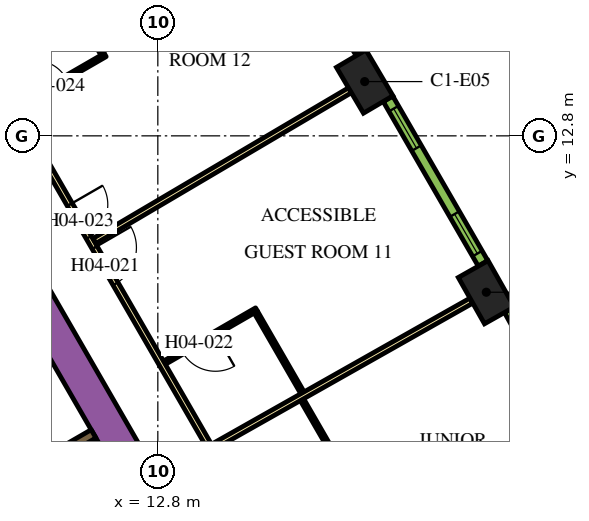
"""IFC4 building model, lengths in metres.
Left out: names, types, materials, properties, quantities, classifications, styles, units other than length and angle.
Written with IfcOpenShell. Run it as: python <this file> out.ifc"""

import sys

from ifc_helpers import new_model, si_unit, direction, frame, frame_2d, origin, origin_2d, place, context, subcontext, project, spatial, rectangle, extrude, element, fill, save


model = new_model("IFC4")
c1 = context("Model", 3, precision=1e-05, world=origin(), true_north=direction((0.0, 1.0)))
c2 = subcontext(c1, "Body", "Model", "MODEL_VIEW")
j1 = project(units=[si_unit("LENGTHUNIT", "METRE"), si_unit("PLANEANGLEUNIT", "RADIAN")], contexts=[c1])
p1 = place(None, origin())
s1 = spatial("IfcSite", under=j1, at=p1, CompositionType="ELEMENT")
p2 = place(p1, origin())
s2 = spatial("IfcBuilding", under=s1, at=p2, CompositionType="ELEMENT")
p3 = place(p2, frame((0.0, 0.0, 70.5)))
s3 = spatial("IfcBuildingStorey", under=s2, at=p3, CompositionType="ELEMENT", Elevation=70.5)
for number, where, z_axis, x_axis in (
    (1, (21.443, 8.685, 0.0), (0.0, 0.0, 1.0), (-0.492, 0.871, 0.0)),
    (2, (18.243, 14.228, 0.0), (0.0, 0.0, 1.0), (-0.508, 0.861, 0.0)),
):
    element("IfcColumn", number, at=place(p3, frame(where, z_axis=z_axis, x_axis=x_axis)), inside=s3, PredefinedType="COLUMN", context=c2, shape_type="SweptSolid", body=[
        extrude(rectangle(XDim=1.4, YDim=0.9, at=origin_2d()), origin(), (0.0, 0.0, 1.0), 3.9),
    ])
p4 = place(p3, frame((6.461, 13.909, 0.0), z_axis=(0.0, 0.0, 1.0), x_axis=(0.500005804227, -0.866022052686, 0.0)))
e3 = element("IfcWall", 3, at=p4, inside=s3, PredefinedType="SOLIDWALL", context=c2, shape_type="SweptSolid", body=[
    extrude(rectangle(XDim=20.834, YDim=0.9, at=frame_2d((10.417, 0.0))), origin(), (0.0, 0.0, 1.0), 3.9),
])
p5 = place(p3, frame((9.204, 3.859, 0.0), z_axis=(0.0, 0.0, 1.0), x_axis=(0.86605622881, 0.499946605688, 0.0)))
e4 = element("IfcWall", 4, at=p5, inside=s3, PredefinedType="SOLIDWALL", context=c2, shape_type="SweptSolid", body=[
    extrude(rectangle(XDim=2.2, YDim=0.25, at=frame_2d((1.1, 0.0))), origin(), (0.0, 0.0, 1.0), 3.9),
])
p6 = place(p3, frame((11.553, -0.46, 0.0), z_axis=(0.0, 0.0, 1.0), x_axis=(-0.500006514828, 0.866021642414, 0.0)))
e5 = element("IfcWall", 5, at=p6, inside=s3, PredefinedType="SOLIDWALL", context=c2, shape_type="SweptSolid", body=[
    extrude(rectangle(XDim=12.35, YDim=0.25, at=frame_2d((6.175, 0.0))), origin(), (0.0, 0.0, 1.0), 3.9),
])
p7 = place(p6, frame((0.585, 0.0, 0.0)))
e6 = element("IfcOpeningElement", 6, at=p7, cuts=e5, PredefinedType="OPENING", context=c2, shape_type="SweptSolid", body=[
    extrude(rectangle(XDim=1.1, YDim=2.1, at=frame_2d((0.55, 1.05))), frame((0.0, 0.135, 0.0), z_axis=(0.0, -1.0, 0.0), x_axis=(1.0, 0.0, 0.0)), (0.0, 0.0, 1.0), 0.27),
])
p8 = place(p6, frame((3.105, 0.0, 0.0)))
e7 = element("IfcOpeningElement", 7, at=p8, cuts=e5, PredefinedType="OPENING", context=c2, shape_type="SweptSolid", body=[
    extrude(rectangle(XDim=1.1, YDim=2.1, at=frame_2d((0.55, 1.05))), frame((0.0, 0.135, 0.0), z_axis=(0.0, -1.0, 0.0), x_axis=(1.0, 0.0, 0.0)), (0.0, 0.0, 1.0), 0.27),
])
p9 = place(p6, frame((5.625, 0.0, 0.0)))
e8 = element("IfcOpeningElement", 8, at=p9, cuts=e5, PredefinedType="OPENING", context=c2, shape_type="SweptSolid", body=[
    extrude(rectangle(XDim=1.1, YDim=2.1, at=frame_2d((0.55, 1.05))), frame((0.0, 0.135, 0.0), z_axis=(0.0, -1.0, 0.0), x_axis=(1.0, 0.0, 0.0)), (0.0, 0.0, 1.0), 0.27),
])
p10 = place(p3, frame((6.163, 18.475, 0.0), z_axis=(0.0, 0.0, 1.0), x_axis=(0.500001317485, -0.866024643133, 0.0)))
e9 = element("IfcWall", 9, at=p10, inside=s3, PredefinedType="PARTITIONING", context=c2, shape_type="SweptSolid", body=[
    extrude(rectangle(XDim=25.767, YDim=0.15, at=frame_2d((12.883, 0.0))), origin(), (0.0, 0.0, 1.0), 2.75),
])
p11 = place(p10, frame((21.138, 0.0, 0.0)))
e10 = element("IfcOpeningElement", 10, at=p11, cuts=e9, PredefinedType="OPENING", context=c2, shape_type="SweptSolid", body=[
    extrude(rectangle(XDim=1.0, YDim=2.1, at=frame_2d((0.5, 1.05))), frame((0.0, 0.085, 0.0), z_axis=(0.0, -1.0, 0.0), x_axis=(1.0, 0.0, 0.0)), (0.0, 0.0, 1.0), 0.17),
])
p12 = place(p10, frame((9.948, 0.0, 0.0)))
e11 = element("IfcOpeningElement", 11, at=p12, cuts=e9, PredefinedType="OPENING", context=c2, shape_type="SweptSolid", body=[
    extrude(rectangle(XDim=1.1, YDim=2.1, at=frame_2d((0.55, 1.05))), frame((0.0, 0.085, 0.0), z_axis=(0.0, -1.0, 0.0), x_axis=(1.0, 0.0, 0.0)), (0.0, 0.0, 1.0), 0.17),
])
p13 = place(p10, frame((8.641, 0.0, 0.0)))
e12 = element("IfcOpeningElement", 12, at=p13, cuts=e9, PredefinedType="OPENING", context=c2, shape_type="SweptSolid", body=[
    extrude(rectangle(XDim=1.0, YDim=2.1, at=frame_2d((0.5, 1.05))), frame((0.0, 0.085, 0.0), z_axis=(0.0, -1.0, 0.0), x_axis=(1.0, 0.0, 0.0)), (0.0, 0.0, 1.0), 0.17),
])
p14 = place(p10, frame((0.18, 0.0, 0.0)))
e13 = element("IfcOpeningElement", 13, at=p14, cuts=e9, PredefinedType="OPENING", context=c2, shape_type="SweptSolid", body=[
    extrude(rectangle(XDim=1.0, YDim=2.1, at=frame_2d((0.5, 1.05))), frame((0.0, 0.085, 0.0), z_axis=(0.0, -1.0, 0.0), x_axis=(1.0, 0.0, 0.0)), (0.0, 0.0, 1.0), 0.17),
])
p15 = place(p3, frame((17.856, 13.999, 0.0), z_axis=(0.0, 0.0, 1.0), x_axis=(-0.861371519381, -0.507975497047, 0.0)))
e14 = element("IfcWall", 14, at=p15, inside=s3, PredefinedType="PARTITIONING", context=c2, shape_type="SweptSolid", body=[
    extrude(rectangle(XDim=7.804, YDim=0.15, at=frame_2d((3.902, 0.0))), origin(), (0.0, 0.0, 1.0), 2.75),
])
p16 = place(p3, frame((21.052, 8.464, 0.0), z_axis=(0.0, 0.0, 1.0), x_axis=(-0.87059371954, -0.492002617368, 0.0)))
e15 = element("IfcWall", 15, at=p16, inside=s3, PredefinedType="PARTITIONING", context=c2, shape_type="SweptSolid", body=[
    extrude(rectangle(XDim=7.803, YDim=0.15, at=frame_2d((3.902, 0.0))), origin(), (0.0, 0.0, 1.0), 2.75),
])
p17 = place(p3, frame((17.646, 4.036, 0.0), z_axis=(0.0, 0.0, 1.0), x_axis=(-0.500027713859, 0.866009402589, 0.0)))
e16 = element("IfcWall", 16, at=p17, inside=s3, PredefinedType="PARTITIONING", context=c2, shape_type="SweptSolid", body=[
    extrude(rectangle(XDim=2.1, YDim=0.1, at=frame_2d((1.05, 0.0))), origin(), (0.0, 0.0, 1.0), 2.75),
])
p18 = place(p3, frame((15.397, 8.231, 0.0), z_axis=(0.0, 0.0, 1.0), x_axis=(-0.866018616679, -0.500011755427, 0.0)))
e17 = element("IfcWall", 17, at=p18, inside=s3, PredefinedType="PARTITIONING", context=c2, shape_type="SweptSolid", body=[
    extrude(rectangle(XDim=2.8, YDim=0.1, at=frame_2d((1.4, 0.0))), origin(), (0.0, 0.0, 1.0), 2.75),
])
p19 = place(p18, frame((1.25, 0.0, 0.0)))
e18 = element("IfcOpeningElement", 18, at=p19, cuts=e17, PredefinedType="OPENING", context=c2, shape_type="SweptSolid", body=[
    extrude(rectangle(XDim=1.0, YDim=2.1, at=frame_2d((0.5, 1.05))), frame((0.0, 0.06, 0.0), z_axis=(0.0, -1.0, 0.0), x_axis=(1.0, 0.0, 0.0)), (0.0, 0.0, 1.0), 0.12),
])
p20 = place(p3, frame((15.379, 8.163, 0.0), z_axis=(0.0, 0.0, 1.0), x_axis=(0.499987006516, -0.866032905446, 0.0)))
e19 = element("IfcWall", 19, at=p20, inside=s3, PredefinedType="PARTITIONING", context=c2, shape_type="SweptSolid", body=[
    extrude(rectangle(XDim=2.45, YDim=0.1, at=frame_2d((1.225, 0.0))), origin(), (0.0, 0.0, 1.0), 2.75),
])
p21 = place(p3, frame((9.077, 13.578, 0.0), z_axis=(0.0, 0.0, 1.0), x_axis=(0.866036505625, 0.499980770555, 0.0)))
e20 = element("IfcWall", 20, at=p21, inside=s3, PredefinedType="PARTITIONING", context=c2, shape_type="SweptSolid", body=[
    extrude(rectangle(XDim=2.7, YDim=0.1, at=frame_2d((1.35, 0.0))), origin(), (0.0, 0.0, 1.0), 2.75),
])
p22 = place(p21, frame((0.6, 0.0, 0.0)))
e21 = element("IfcOpeningElement", 21, at=p22, cuts=e20, PredefinedType="OPENING", context=c2, shape_type="SweptSolid", body=[
    extrude(rectangle(XDim=0.9, YDim=2.1, at=frame_2d((0.45, 1.05))), frame((0.0, 0.06, 0.0), z_axis=(0.0, -1.0, 0.0), x_axis=(1.0, 0.0, 0.0)), (0.0, 0.0, 1.0), 0.12),
])
p23 = place(p3, frame((11.342, 14.955, 0.0), z_axis=(0.0, 0.0, 1.0), x_axis=(-0.500008976872, 0.866020220923, 0.0)))
e22 = element("IfcWall", 22, at=p23, inside=s3, PredefinedType="PARTITIONING", context=c2, shape_type="SweptSolid", body=[
    extrude(rectangle(XDim=2.09, YDim=0.1, at=frame_2d((1.045, 0.0))), origin(), (0.0, 0.0, 1.0), 2.75),
])
p24 = place(p3, frame((24.468, 3.846, 0.0), z_axis=(0.0, 0.0, 1.0), x_axis=(-0.483912572871, 0.875116347589, 0.0)))
e23 = element("IfcWall", 23, at=p24, inside=s3, PredefinedType="SOLIDWALL", context=c2, shape_type="SweptSolid", body=[
    extrude(rectangle(XDim=4.998, YDim=0.29, at=frame_2d((2.499, 0.0))), origin(), (0.0, 0.0, 1.0), 3.65),
])
p25 = place(p24, frame((0.297, 0.0, 0.9)))
e24 = element("IfcOpeningElement", 24, at=p25, cuts=e23, PredefinedType="OPENING", context=c2, shape_type="SweptSolid", body=[
    extrude(rectangle(XDim=1.2, YDim=2.15, at=frame_2d((0.6, 1.075))), frame((0.0, 0.155, 0.0), z_axis=(0.0, -1.0, 0.0), x_axis=(1.0, 0.0, 0.0)), (0.0, 0.0, 1.0), 0.31),
])
p26 = place(p24, frame((3.501, 0.0, 0.9)))
e25 = element("IfcOpeningElement", 25, at=p26, cuts=e23, PredefinedType="OPENING", context=c2, shape_type="SweptSolid", body=[
    extrude(rectangle(XDim=1.2, YDim=2.15, at=frame_2d((0.6, 1.075))), frame((0.0, 0.155, 0.0), z_axis=(0.0, -1.0, 0.0), x_axis=(1.0, 0.0, 0.0)), (0.0, 0.0, 1.0), 0.31),
])
p27 = place(p3, frame((21.357, 9.445, 0.0), z_axis=(0.0, 0.0, 1.0), x_axis=(-0.50002123722, 0.866013142123, 0.0)))
e26 = element("IfcWall", 26, at=p27, inside=s3, PredefinedType="SOLIDWALL", context=c2, shape_type="SweptSolid", body=[
    extrude(rectangle(XDim=4.998, YDim=0.29, at=frame_2d((2.499, 0.0))), origin(), (0.0, 0.0, 1.0), 3.65),
])
p28 = place(p27, frame((0.297, 0.0, 0.9)))
e27 = element("IfcOpeningElement", 27, at=p28, cuts=e26, PredefinedType="OPENING", context=c2, shape_type="SweptSolid", body=[
    extrude(rectangle(XDim=1.2, YDim=2.15, at=frame_2d((0.6, 1.075))), frame((0.0, 0.155, 0.0), z_axis=(0.0, -1.0, 0.0), x_axis=(1.0, 0.0, 0.0)), (0.0, 0.0, 1.0), 0.31),
])
p29 = place(p27, frame((3.501, 0.0, 0.9)))
e28 = element("IfcOpeningElement", 28, at=p29, cuts=e26, PredefinedType="OPENING", context=c2, shape_type="SweptSolid", body=[
    extrude(rectangle(XDim=1.2, YDim=2.15, at=frame_2d((0.6, 1.075))), frame((0.0, 0.155, 0.0), z_axis=(0.0, -1.0, 0.0), x_axis=(1.0, 0.0, 0.0)), (0.0, 0.0, 1.0), 0.31),
])
p30 = place(p3, frame((18.143, 14.986, 0.0), z_axis=(0.0, 0.0, 1.0), x_axis=(-0.515938796285, 0.856625448191, 0.0)))
e29 = element("IfcWall", 29, at=p30, inside=s3, PredefinedType="SOLIDWALL", context=c2, shape_type="SweptSolid", body=[
    extrude(rectangle(XDim=4.998, YDim=0.29, at=frame_2d((2.499, 0.0))), origin(), (0.0, 0.0, 1.0), 3.65),
])
p31 = place(p30, frame((0.297, 0.0, 0.9)))
e30 = element("IfcOpeningElement", 30, at=p31, cuts=e29, PredefinedType="OPENING", context=c2, shape_type="SweptSolid", body=[
    extrude(rectangle(XDim=1.2, YDim=2.15, at=frame_2d((0.6, 1.075))), frame((0.0, 0.155, 0.0), z_axis=(0.0, -1.0, 0.0), x_axis=(1.0, 0.0, 0.0)), (0.0, 0.0, 1.0), 0.31),
])
p32 = place(p30, frame((3.501, 0.0, 0.9)))
e31 = element("IfcOpeningElement", 31, at=p32, cuts=e29, PredefinedType="OPENING", context=c2, shape_type="SweptSolid", body=[
    extrude(rectangle(XDim=1.2, YDim=2.15, at=frame_2d((0.6, 1.075))), frame((0.0, 0.155, 0.0), z_axis=(0.0, -1.0, 0.0), x_axis=(1.0, 0.0, 0.0)), (0.0, 0.0, 1.0), 0.31),
])
p33 = place(p12, origin())
e32 = element("IfcDoor", 32, at=p33, inside=s3, OperationType="SINGLE_SWING_LEFT", PredefinedType="DOOR", context=c2, shape_type="SweptSolid", body=[
    extrude(rectangle(XDim=1.1, YDim=2.1, at=frame_2d((0.55, 1.05))), frame((0.0, 0.025, 0.0), z_axis=(0.0, -1.0, 0.0), x_axis=(1.0, 0.0, 0.0)), (0.0, 0.0, 1.0), 0.05),
])
fill(e11, e32)
p34 = place(p19, origin())
e33 = element("IfcDoor", 33, at=p34, inside=s3, OperationType="SINGLE_SWING_LEFT", PredefinedType="DOOR", context=c2, shape_type="SweptSolid", body=[
    extrude(rectangle(XDim=1.0, YDim=2.1, at=frame_2d((0.5, 1.05))), frame((0.0, 0.025, 0.0), z_axis=(0.0, -1.0, 0.0), x_axis=(1.0, 0.0, 0.0)), (0.0, 0.0, 1.0), 0.05),
])
fill(e18, e33)
p35 = place(p13, origin())
e34 = element("IfcDoor", 34, at=p35, inside=s3, OperationType="SINGLE_SWING_RIGHT", PredefinedType="DOOR", context=c2, shape_type="SweptSolid", body=[
    extrude(rectangle(XDim=1.0, YDim=2.1, at=frame_2d((0.5, 1.05))), frame((0.0, 0.025, 0.0), z_axis=(0.0, -1.0, 0.0), x_axis=(1.0, 0.0, 0.0)), (0.0, 0.0, 1.0), 0.05),
])
fill(e12, e34)
p36 = place(p22, origin())
e35 = element("IfcDoor", 35, at=p36, inside=s3, OperationType="SINGLE_SWING_RIGHT", PredefinedType="DOOR", context=c2, shape_type="SweptSolid", body=[
    extrude(rectangle(XDim=0.9, YDim=2.1, at=frame_2d((0.45, 1.05))), frame((0.0, 0.025, 0.0), z_axis=(0.0, -1.0, 0.0), x_axis=(1.0, 0.0, 0.0)), (0.0, 0.0, 1.0), 0.05),
])
fill(e21, e35)
p37 = place(p28, origin())
e36 = element("IfcWindow", 36, at=p37, inside=s3, PartitioningType="DOUBLE_PANEL_VERTICAL", PredefinedType="WINDOW", context=c2, shape_type="SweptSolid", body=[
    extrude(rectangle(XDim=1.2, YDim=2.15, at=frame_2d((0.6, 1.075))), frame((0.0, 0.015, 0.0), z_axis=(0.0, -1.0, 0.0), x_axis=(1.0, 0.0, 0.0)), (0.0, 0.0, 1.0), 0.06),
])
fill(e27, e36)
p38 = place(p29, origin())
e37 = element("IfcWindow", 37, at=p38, inside=s3, PartitioningType="DOUBLE_PANEL_VERTICAL", PredefinedType="WINDOW", context=c2, shape_type="SweptSolid", body=[
    extrude(rectangle(XDim=1.2, YDim=2.15, at=frame_2d((0.6, 1.075))), frame((0.0, 0.015, 0.0), z_axis=(0.0, -1.0, 0.0), x_axis=(1.0, 0.0, 0.0)), (0.0, 0.0, 1.0), 0.06),
])
fill(e28, e37)
save(model, sys.argv[1])
